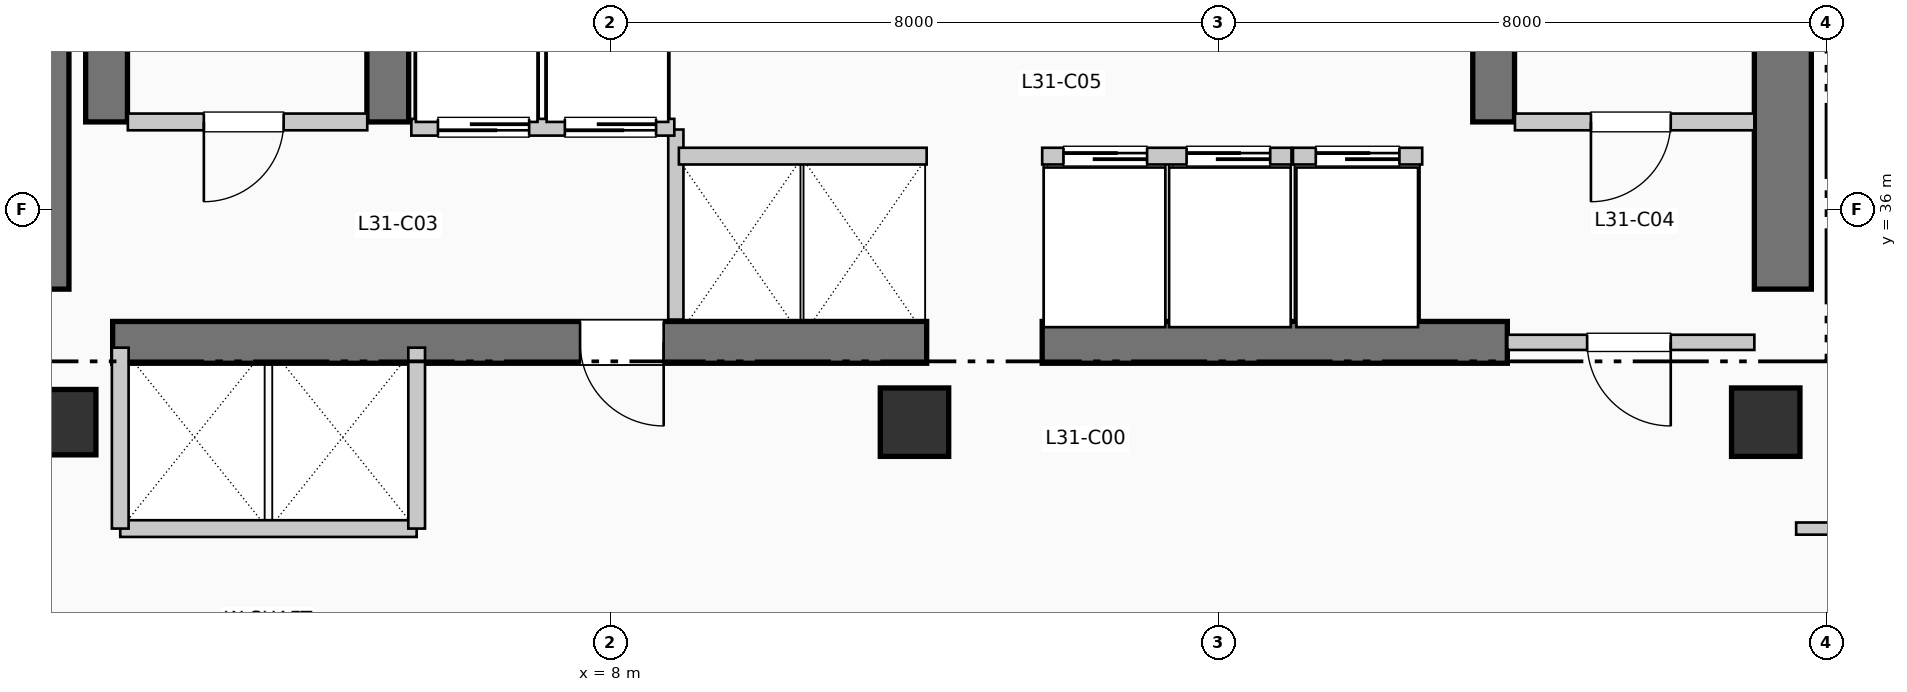
"""IFC4 building model, lengths in metres.
Left out: names, types, materials, properties, quantities, classifications, styles, units other than length and angle.
Written with IfcOpenShell. Run it as: python <this file> out.ifc"""

import sys

from ifc_helpers import new_model, si_unit, direction, frame, frame_2d, origin, origin_2d, place, context, subcontext, project, spatial, rectangle, extrude, element, fill, save


model = new_model("IFC4")
c1 = context("Model", 3, precision=1e-05, world=origin(), true_north=direction((0.0, 1.0)))
c2 = subcontext(c1, "Body", "Model", "MODEL_VIEW")
j1 = project(units=[si_unit("LENGTHUNIT", "METRE"), si_unit("PLANEANGLEUNIT", "RADIAN")], contexts=[c1])
p1 = place(None, origin())
s1 = spatial("IfcSite", under=j1, at=p1, CompositionType="ELEMENT")
p2 = place(p1, origin())
s2 = spatial("IfcBuilding", under=s1, at=p2, CompositionType="ELEMENT")
p3 = place(p2, frame((0.0, 0.0, 130.35)))
s3 = spatial("IfcBuildingStorey", under=s2, at=p3, CompositionType="ELEMENT", Elevation=130.35)
p4 = place(p3, frame((0.5, 34.95, 0.0), z_axis=(0.0, 0.0, 1.0), x_axis=(0.0, 1.0, 0.0)))
e1 = element("IfcWall", 1, at=p4, inside=s3, PredefinedType="SHEAR", context=c2, shape_type="SweptSolid", body=[
    extrude(rectangle(XDim=7.9, YDim=0.75, at=frame_2d((3.95, 0.0))), origin(), (0.0, 0.0, 1.0), 4.62),
])
p5 = place(p3, frame((23.425, 34.95, 0.0), z_axis=(0.0, 0.0, 1.0), x_axis=(0.0, 1.0, 0.0)))
e2 = element("IfcWall", 2, at=p5, inside=s3, PredefinedType="SHEAR", context=c2, shape_type="SweptSolid", body=[
    extrude(rectangle(XDim=10.64, YDim=0.75, at=frame_2d((5.32, 0.0))), origin(), (0.0, 0.0, 1.0), 4.62),
])
p6 = place(p3, frame((1.45, 34.25, 0.0), z_axis=(0.0, 0.0, 1.0), x_axis=(1.0, 0.0, 0.0)))
e3 = element("IfcWall", 3, at=p6, inside=s3, PredefinedType="SHEAR", context=c2, shape_type="SweptSolid", body=[
    extrude(rectangle(XDim=10.71, YDim=0.55, at=frame_2d((5.355, 0.0))), origin(), (0.0, 0.0, 1.0), 4.62),
])
p7 = place(p6, frame((7.25, 0.0, 0.0), z_axis=(0.0, 0.0, 1.0), x_axis=(-1.0, 0.0, 0.0)))
e4 = element("IfcOpeningElement", 4, at=p7, cuts=e3, PredefinedType="OPENING", context=c2, shape_type="SweptSolid", body=[
    extrude(rectangle(XDim=1.1, YDim=2.15, at=frame_2d((0.55, 1.075))), frame((0.0, 0.285, 0.0), z_axis=(0.0, -1.0, 0.0), x_axis=(1.0, 0.0, 0.0)), (0.0, 0.0, 1.0), 0.57),
])
p8 = place(p3, frame((13.68, 34.25, 0.0), z_axis=(0.0, 0.0, 1.0), x_axis=(1.0, 0.0, 0.0)))
e5 = element("IfcWall", 5, at=p8, inside=s3, PredefinedType="SHEAR", context=c2, shape_type="SweptSolid", body=[
    extrude(rectangle(XDim=6.12, YDim=0.55, at=frame_2d((3.06, 0.0))), origin(), (0.0, 0.0, 1.0), 4.62),
])
for number, where, z_axis, x_axis in (
    (6, (1.37, 37.15, 0.0), (0.0, 0.0, 1.0), (0.0, 1.0, 0.0)),
    (7, (5.07, 37.15, 0.0), (0.0, 0.0, 1.0), (0.0, 1.0, 0.0)),
    (8, (19.62, 37.15, 0.0), (0.0, 0.0, 1.0), (0.0, 1.0, 0.0)),
):
    element("IfcWall", number, at=place(p3, frame(where, z_axis=z_axis, x_axis=x_axis)), inside=s3, PredefinedType="SHEAR", context=c2, shape_type="SweptSolid", body=[
        extrude(rectangle(XDim=7.89, YDim=0.55, at=frame_2d((3.945, 0.0))), origin(), (0.0, 0.0, 1.0), 4.62),
    ])
p9 = place(p3, frame((0.8, 33.2, 0.0), z_axis=(0.0, 0.0, 1.0), x_axis=(1.0, 0.0, 0.0)))
e9 = element("IfcColumn", 9, at=p9, inside=s3, PredefinedType="COLUMN", context=c2, shape_type="SweptSolid", body=[
    extrude(rectangle(XDim=0.86, YDim=0.86, at=origin_2d()), origin(), (0.0, 0.0, 1.0), 4.62),
])
for number, where, z_axis, x_axis in (
    (10, (12.0, 33.2, 0.0), (0.0, 0.0, 1.0), (1.0, 0.0, 0.0)),
    (11, (23.2, 33.2, 0.0), (0.0, 0.0, 1.0), (1.0, 0.0, 0.0)),
):
    element("IfcColumn", number, at=place(p3, frame(where, z_axis=z_axis, x_axis=x_axis)), inside=s3, PredefinedType="COLUMN", context=c2, shape_type="SweptSolid", body=[
        extrude(rectangle(XDim=0.9, YDim=0.9, at=origin_2d()), origin(), (0.0, 0.0, 1.0), 4.62),
    ])
p10 = place(p3, frame((1.65, 37.15, 0.0), z_axis=(0.0, 0.0, 1.0), x_axis=(1.0, 0.0, 0.0)))
e12 = element("IfcWall", 12, at=p10, inside=s3, PredefinedType="PARTITIONING", context=c2, shape_type="SweptSolid", body=[
    extrude(rectangle(XDim=3.15, YDim=0.22, at=frame_2d((1.575, 0.0))), origin(), (0.0, 0.0, 1.0), 4.37),
])
p11 = place(p10, frame((2.05, 0.0, 0.0), z_axis=(0.0, 0.0, 1.0), x_axis=(-1.0, 0.0, 0.0)))
e13 = element("IfcOpeningElement", 13, at=p11, cuts=e12, PredefinedType="OPENING", context=c2, shape_type="SweptSolid", body=[
    extrude(rectangle(XDim=1.05, YDim=2.15, at=frame_2d((0.525, 1.075))), frame((0.0, 0.12, 0.0), z_axis=(0.0, -1.0, 0.0), x_axis=(1.0, 0.0, 0.0)), (0.0, 0.0, 1.0), 0.24),
])
p12 = place(p3, frame((8.86, 34.55, 0.0), z_axis=(0.0, 0.0, 1.0), x_axis=(0.0, 1.0, 0.0)))
e14 = element("IfcWall", 14, at=p12, inside=s3, PredefinedType="PARTITIONING", context=c2, shape_type="SweptSolid", body=[
    extrude(rectangle(XDim=2.5, YDim=0.2, at=frame_2d((1.25, 0.0))), origin(), (0.0, 0.0, 1.0), 4.37),
])
p13 = place(p3, frame((19.9, 37.15, 0.0), z_axis=(0.0, 0.0, 1.0), x_axis=(1.0, 0.0, 0.0)))
e15 = element("IfcWall", 15, at=p13, inside=s3, PredefinedType="PARTITIONING", context=c2, shape_type="SweptSolid", body=[
    extrude(rectangle(XDim=3.15, YDim=0.22, at=frame_2d((1.575, 0.0))), origin(), (0.0, 0.0, 1.0), 4.37),
])
p14 = place(p13, frame((2.05, 0.0, 0.0), z_axis=(0.0, 0.0, 1.0), x_axis=(-1.0, 0.0, 0.0)))
e16 = element("IfcOpeningElement", 16, at=p14, cuts=e15, PredefinedType="OPENING", context=c2, shape_type="SweptSolid", body=[
    extrude(rectangle(XDim=1.05, YDim=2.15, at=frame_2d((0.525, 1.075))), frame((0.0, 0.12, 0.0), z_axis=(0.0, -1.0, 0.0), x_axis=(1.0, 0.0, 0.0)), (0.0, 0.0, 1.0), 0.24),
])
p15 = place(p3, frame((19.8, 34.25, 0.0), z_axis=(0.0, 0.0, 1.0), x_axis=(1.0, 0.0, 0.0)))
e17 = element("IfcWall", 17, at=p15, inside=s3, PredefinedType="PARTITIONING", context=c2, shape_type="SweptSolid", body=[
    extrude(rectangle(XDim=3.25, YDim=0.2, at=frame_2d((1.625, 0.0))), origin(), (0.0, 0.0, 1.0), 4.37),
])
p16 = place(p15, frame((2.15, 0.0, 0.0), z_axis=(0.0, 0.0, 1.0), x_axis=(-1.0, 0.0, 0.0)))
e18 = element("IfcOpeningElement", 18, at=p16, cuts=e17, PredefinedType="OPENING", context=c2, shape_type="SweptSolid", body=[
    extrude(rectangle(XDim=1.1, YDim=2.15, at=frame_2d((0.55, 1.075))), frame((0.0, 0.11, 0.0), z_axis=(0.0, -1.0, 0.0), x_axis=(1.0, 0.0, 0.0)), (0.0, 0.0, 1.0), 0.22),
])
p17 = place(p3, frame((5.38, 37.08, 0.0), z_axis=(0.0, 0.0, 1.0), x_axis=(1.0, 0.0, 0.0)))
e19 = element("IfcWall", 19, at=p17, inside=s3, PredefinedType="PARTITIONING", context=c2, shape_type="SweptSolid", body=[
    extrude(rectangle(XDim=3.46, YDim=0.22, at=frame_2d((1.73, 0.0))), origin(), (0.0, 0.0, 1.0), 4.37),
])
p18 = place(p17, frame((1.55, 0.0, 0.0), z_axis=(0.0, 0.0, 1.0), x_axis=(-1.0, 0.0, 0.0)))
e20 = element("IfcOpeningElement", 20, at=p18, cuts=e19, PredefinedType="OPENING", context=c2, shape_type="SweptSolid", body=[
    extrude(rectangle(XDim=1.2, YDim=2.2, at=frame_2d((0.6, 1.1))), frame((0.0, 0.12, 0.0), z_axis=(0.0, -1.0, 0.0), x_axis=(1.0, 0.0, 0.0)), (0.0, 0.0, 1.0), 0.24),
])
p19 = place(p17, frame((3.22, 0.0, 0.0), z_axis=(0.0, 0.0, 1.0), x_axis=(-1.0, 0.0, 0.0)))
e21 = element("IfcOpeningElement", 21, at=p19, cuts=e19, PredefinedType="OPENING", context=c2, shape_type="SweptSolid", body=[
    extrude(rectangle(XDim=1.2, YDim=2.2, at=frame_2d((0.6, 1.1))), frame((0.0, 0.12, 0.0), z_axis=(0.0, -1.0, 0.0), x_axis=(1.0, 0.0, 0.0)), (0.0, 0.0, 1.0), 0.24),
])
p20 = place(p3, frame((1.55, 31.8, 0.0), z_axis=(0.0, 0.0, 1.0), x_axis=(1.0, 0.0, 0.0)))
e22 = element("IfcWall", 22, at=p20, inside=s3, PredefinedType="PARTITIONING", context=c2, shape_type="SweptSolid", body=[
    extrude(rectangle(XDim=3.9, YDim=0.22, at=frame_2d((1.95, 0.0))), origin(), (0.0, 0.0, 1.0), 4.37),
])
for number, where, z_axis, x_axis in (
    (23, (1.55, 31.8, 0.0), (0.0, 0.0, 1.0), (0.0, 1.0, 0.0)),
    (24, (5.45, 31.8, 0.0), (0.0, 0.0, 1.0), (0.0, 1.0, 0.0)),
):
    element("IfcWall", number, at=place(p3, frame(where, z_axis=z_axis, x_axis=x_axis)), inside=s3, PredefinedType="PARTITIONING", context=c2, shape_type="SweptSolid", body=[
        extrude(rectangle(XDim=2.38, YDim=0.22, at=frame_2d((1.19, 0.0))), origin(), (0.0, 0.0, 1.0), 4.37),
    ])
p21 = place(p3, frame((8.9, 36.7, 0.0), z_axis=(0.0, 0.0, 1.0), x_axis=(1.0, 0.0, 0.0)))
e25 = element("IfcWall", 25, at=p21, inside=s3, PredefinedType="PARTITIONING", context=c2, shape_type="SweptSolid", body=[
    extrude(rectangle(XDim=3.26, YDim=0.22, at=frame_2d((1.63, 0.0))), origin(), (0.0, 0.0, 1.0), 4.37),
])
p22 = place(p3, frame((13.68, 36.7, 0.0), z_axis=(0.0, 0.0, 1.0), x_axis=(1.0, 0.0, 0.0)))
e26 = element("IfcWall", 26, at=p22, inside=s3, PredefinedType="PARTITIONING", context=c2, shape_type="SweptSolid", body=[
    extrude(rectangle(XDim=3.28, YDim=0.22, at=frame_2d((1.64, 0.0))), origin(), (0.0, 0.0, 1.0), 4.37),
])
p23 = place(p22, frame((0.28, 0.0, 0.0)))
e27 = element("IfcOpeningElement", 27, at=p23, cuts=e26, PredefinedType="OPENING", context=c2, shape_type="SweptSolid", body=[
    extrude(rectangle(XDim=1.1, YDim=2.2, at=frame_2d((0.55, 1.1))), frame((0.0, 0.12, 0.0), z_axis=(0.0, -1.0, 0.0), x_axis=(1.0, 0.0, 0.0)), (0.0, 0.0, 1.0), 0.24),
])
p24 = place(p22, frame((1.9, 0.0, 0.0)))
e28 = element("IfcOpeningElement", 28, at=p24, cuts=e26, PredefinedType="OPENING", context=c2, shape_type="SweptSolid", body=[
    extrude(rectangle(XDim=1.1, YDim=2.2, at=frame_2d((0.55, 1.1))), frame((0.0, 0.12, 0.0), z_axis=(0.0, -1.0, 0.0), x_axis=(1.0, 0.0, 0.0)), (0.0, 0.0, 1.0), 0.24),
])
p25 = place(p3, frame((16.98, 36.7, 0.0), z_axis=(0.0, 0.0, 1.0), x_axis=(1.0, 0.0, 0.0)))
e29 = element("IfcWall", 29, at=p25, inside=s3, PredefinedType="PARTITIONING", context=c2, shape_type="SweptSolid", body=[
    extrude(rectangle(XDim=1.7, YDim=0.22, at=frame_2d((0.85, 0.0))), origin(), (0.0, 0.0, 1.0), 4.37),
])
p26 = place(p25, frame((0.3, 0.0, 0.0)))
e30 = element("IfcOpeningElement", 30, at=p26, cuts=e29, PredefinedType="OPENING", context=c2, shape_type="SweptSolid", body=[
    extrude(rectangle(XDim=1.1, YDim=2.2, at=frame_2d((0.55, 1.1))), frame((0.0, 0.12, 0.0), z_axis=(0.0, -1.0, 0.0), x_axis=(1.0, 0.0, 0.0)), (0.0, 0.0, 1.0), 0.24),
])
p27 = place(p3, frame((23.6, 31.8, 0.0), z_axis=(0.0, 0.0, 1.0), x_axis=(1.0, 0.0, 0.0)))
e31 = element("IfcWall", 31, at=p27, inside=s3, PredefinedType="PARTITIONING", context=c2, shape_type="SweptSolid", body=[
    extrude(rectangle(XDim=26.41, YDim=0.16, at=frame_2d((13.205, 0.0))), origin(), (0.0, 0.0, 1.0), 4.37),
])
p28 = place(p27, frame((2.694, 0.0, 0.0)))
e32 = element("IfcOpeningElement", 32, at=p28, cuts=e31, PredefinedType="OPENING", context=c2, shape_type="SweptSolid", body=[
    extrude(rectangle(XDim=0.95, YDim=2.15, at=frame_2d((0.475, 1.075))), frame((0.0, 0.09, 0.0), z_axis=(0.0, -1.0, 0.0), x_axis=(1.0, 0.0, 0.0)), (0.0, 0.0, 1.0), 0.18),
])
p29 = place(p27, frame((9.825, 0.0, 0.0)))
e33 = element("IfcOpeningElement", 33, at=p29, cuts=e31, PredefinedType="OPENING", context=c2, shape_type="SweptSolid", body=[
    extrude(rectangle(XDim=0.95, YDim=2.15, at=frame_2d((0.475, 1.075))), frame((0.0, 0.09, 0.0), z_axis=(0.0, -1.0, 0.0), x_axis=(1.0, 0.0, 0.0)), (0.0, 0.0, 1.0), 0.18),
])
p30 = place(p27, frame((17.22, 0.0, 0.0)))
e34 = element("IfcOpeningElement", 34, at=p30, cuts=e31, PredefinedType="OPENING", context=c2, shape_type="SweptSolid", body=[
    extrude(rectangle(XDim=0.95, YDim=2.15, at=frame_2d((0.475, 1.075))), frame((0.0, 0.09, 0.0), z_axis=(0.0, -1.0, 0.0), x_axis=(1.0, 0.0, 0.0)), (0.0, 0.0, 1.0), 0.18),
])
p31 = place(p27, frame((23.294, 0.0, 0.0)))
e35 = element("IfcOpeningElement", 35, at=p31, cuts=e31, PredefinedType="OPENING", context=c2, shape_type="SweptSolid", body=[
    extrude(rectangle(XDim=0.95, YDim=2.15, at=frame_2d((0.475, 1.075))), frame((0.0, 0.09, 0.0), z_axis=(0.0, -1.0, 0.0), x_axis=(1.0, 0.0, 0.0)), (0.0, 0.0, 1.0), 0.18),
])
p32 = place(p11, origin())
e36 = element("IfcDoor", 36, at=p32, inside=s3, OperationType="SINGLE_SWING_LEFT", PredefinedType="DOOR", context=c2, shape_type="SweptSolid", body=[
    extrude(rectangle(XDim=1.05, YDim=2.15, at=frame_2d((0.525, 1.075))), frame((0.0, 0.025, 0.0), z_axis=(0.0, -1.0, 0.0), x_axis=(1.0, 0.0, 0.0)), (0.0, 0.0, 1.0), 0.05),
])
fill(e13, e36)
p33 = place(p7, origin())
e37 = element("IfcDoor", 37, at=p33, inside=s3, OperationType="SINGLE_SWING_RIGHT", PredefinedType="DOOR", context=c2, shape_type="SweptSolid", body=[
    extrude(rectangle(XDim=1.1, YDim=2.15, at=frame_2d((0.55, 1.075))), frame((0.0, 0.025, 0.0), z_axis=(0.0, -1.0, 0.0), x_axis=(1.0, 0.0, 0.0)), (0.0, 0.0, 1.0), 0.05),
])
fill(e4, e37)
p34 = place(p14, origin())
e38 = element("IfcDoor", 38, at=p34, inside=s3, OperationType="SINGLE_SWING_LEFT", PredefinedType="DOOR", context=c2, shape_type="SweptSolid", body=[
    extrude(rectangle(XDim=1.05, YDim=2.15, at=frame_2d((0.525, 1.075))), frame((0.0, 0.025, 0.0), z_axis=(0.0, -1.0, 0.0), x_axis=(1.0, 0.0, 0.0)), (0.0, 0.0, 1.0), 0.05),
])
fill(e16, e38)
p35 = place(p16, origin())
e39 = element("IfcDoor", 39, at=p35, inside=s3, OperationType="SINGLE_SWING_RIGHT", PredefinedType="DOOR", context=c2, shape_type="SweptSolid", body=[
    extrude(rectangle(XDim=1.1, YDim=2.15, at=frame_2d((0.55, 1.075))), frame((0.0, 0.025, 0.0), z_axis=(0.0, -1.0, 0.0), x_axis=(1.0, 0.0, 0.0)), (0.0, 0.0, 1.0), 0.05),
])
fill(e18, e39)
p36 = place(p18, origin())
e40 = element("IfcDoor", 40, at=p36, inside=s3, OperationType="SLIDING_TO_RIGHT", PredefinedType="DOOR", context=c2, shape_type="SweptSolid", body=[
    extrude(rectangle(XDim=1.2, YDim=2.2, at=frame_2d((0.6, 1.1))), frame((0.0, 0.025, 0.0), z_axis=(0.0, -1.0, 0.0), x_axis=(1.0, 0.0, 0.0)), (0.0, 0.0, 1.0), 0.05),
])
fill(e20, e40)
p37 = place(p19, origin())
e41 = element("IfcDoor", 41, at=p37, inside=s3, OperationType="SLIDING_TO_RIGHT", PredefinedType="DOOR", context=c2, shape_type="SweptSolid", body=[
    extrude(rectangle(XDim=1.2, YDim=2.2, at=frame_2d((0.6, 1.1))), frame((0.0, 0.025, 0.0), z_axis=(0.0, -1.0, 0.0), x_axis=(1.0, 0.0, 0.0)), (0.0, 0.0, 1.0), 0.05),
])
fill(e21, e41)
p38 = place(p23, origin())
e42 = element("IfcDoor", 42, at=p38, inside=s3, OperationType="SLIDING_TO_RIGHT", PredefinedType="DOOR", context=c2, shape_type="SweptSolid", body=[
    extrude(rectangle(XDim=1.1, YDim=2.2, at=frame_2d((0.55, 1.1))), frame((0.0, 0.025, 0.0), z_axis=(0.0, -1.0, 0.0), x_axis=(1.0, 0.0, 0.0)), (0.0, 0.0, 1.0), 0.05),
])
fill(e27, e42)
p39 = place(p24, origin())
e43 = element("IfcDoor", 43, at=p39, inside=s3, OperationType="SLIDING_TO_RIGHT", PredefinedType="DOOR", context=c2, shape_type="SweptSolid", body=[
    extrude(rectangle(XDim=1.1, YDim=2.2, at=frame_2d((0.55, 1.1))), frame((0.0, 0.025, 0.0), z_axis=(0.0, -1.0, 0.0), x_axis=(1.0, 0.0, 0.0)), (0.0, 0.0, 1.0), 0.05),
])
fill(e28, e43)
p40 = place(p26, origin())
e44 = element("IfcDoor", 44, at=p40, inside=s3, OperationType="SLIDING_TO_LEFT", PredefinedType="DOOR", context=c2, shape_type="SweptSolid", body=[
    extrude(rectangle(XDim=1.1, YDim=2.2, at=frame_2d((0.55, 1.1))), frame((0.0, 0.025, 0.0), z_axis=(0.0, -1.0, 0.0), x_axis=(1.0, 0.0, 0.0)), (0.0, 0.0, 1.0), 0.05),
])
fill(e30, e44)
save(model, sys.argv[1])
